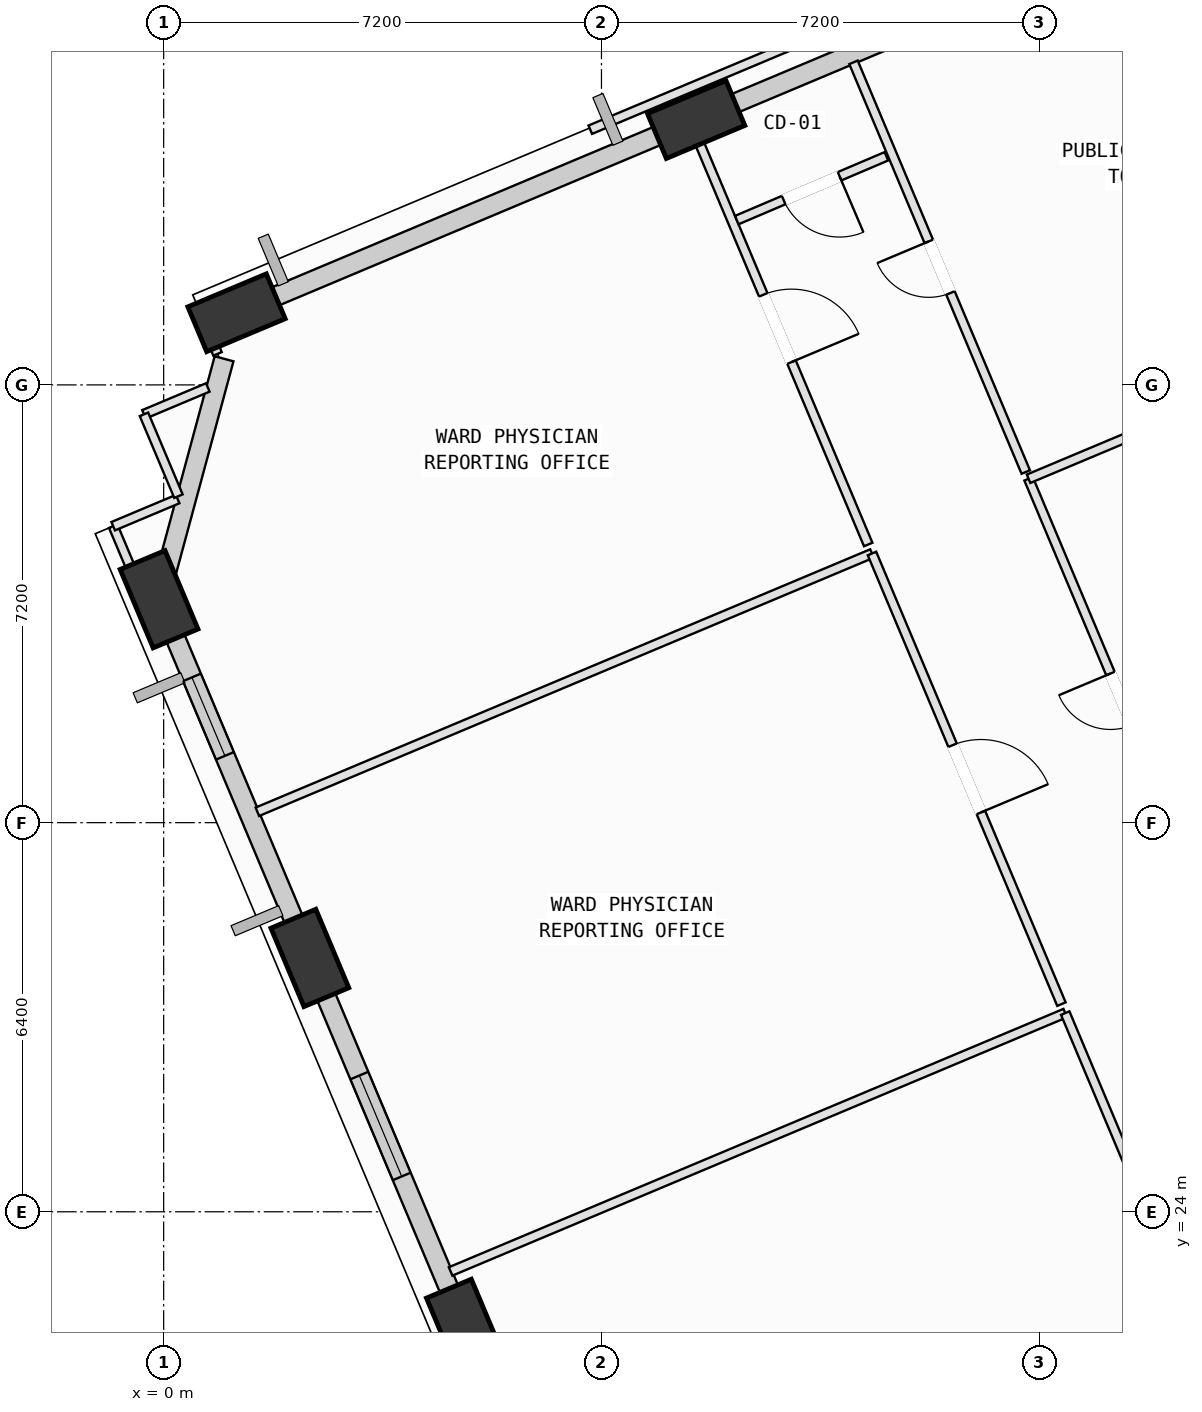
"""IFC4 building model, lengths in metres.
Left out: names, types, materials, properties, quantities, classifications, styles, units other than length and angle.
Written with IfcOpenShell. Run it as: python <this file> out.ifc"""

import sys

from ifc_helpers import new_model, si_unit, direction, frame, frame_2d, origin, origin_2d, place, context, subcontext, project, spatial, rectangle, extrude, element, fill, save


model = new_model("IFC4")
c1 = context("Model", 3, precision=1e-05, world=origin(), true_north=direction((0.0, 1.0)))
c2 = subcontext(c1, "Body", "Model", "MODEL_VIEW")
j1 = project(units=[si_unit("LENGTHUNIT", "METRE"), si_unit("PLANEANGLEUNIT", "RADIAN")], contexts=[c1])
p1 = place(None, origin())
s1 = spatial("IfcSite", under=j1, at=p1, CompositionType="ELEMENT")
p2 = place(p1, origin())
s2 = spatial("IfcBuilding", under=s1, at=p2, CompositionType="ELEMENT")
p3 = place(p2, frame((0.0, 0.0, 120.4)))
s3 = spatial("IfcBuildingStorey", under=s2, at=p3, CompositionType="ELEMENT", Elevation=120.4)
p4 = place(p3, frame((8.757, 41.964, 0.002), z_axis=(-0.069771417755, -0.102747656903, 0.992257460675), x_axis=(0.978659051429, -0.199775110531, 0.048128642913)))
e1 = element("IfcColumn", 1, at=p4, inside=s3, PredefinedType="COLUMN", context=c2, shape_type="SweptSolid", body=[
    extrude(rectangle(XDim=1.4, YDim=0.8, at=origin_2d()), origin(), (0.0, 0.0, 1.0), 4.028),
])
p5 = place(p3, frame((1.198, 38.786, 0.002), z_axis=(-0.056216653726, -0.133348320558, 0.989473553587), x_axis=(0.998414843252, -0.004791929271, 0.056078856879)))
e2 = element("IfcColumn", 2, at=p5, inside=s3, PredefinedType="COLUMN", context=c2, shape_type="SweptSolid", body=[
    extrude(rectangle(XDim=1.4, YDim=0.8, at=origin_2d()), origin(), (0.0, 0.0, 1.0), 4.039),
])
p6 = place(p3, frame((-0.075, 34.075, 0.002), z_axis=(-0.036941426088, -0.138454772083, 0.989679547695), x_axis=(-0.139219445833, 0.981410805172, 0.132101390582)))
e3 = element("IfcColumn", 3, at=p6, inside=s3, PredefinedType="COLUMN", context=c2, shape_type="SweptSolid", body=[
    extrude(rectangle(XDim=1.4, YDim=0.8, at=origin_2d()), origin(), (0.0, 0.0, 1.0), 4.038),
])
p7 = place(p3, frame((2.405, 28.175, 0.002), z_axis=(-0.012782507671, -0.128370302159, 0.991643924512), x_axis=(-0.295028824763, 0.948058445469, 0.118925087905)))
e4 = element("IfcColumn", 4, at=p7, inside=s3, PredefinedType="COLUMN", context=c2, shape_type="SweptSolid", body=[
    extrude(rectangle(XDim=1.4, YDim=0.8, at=origin_2d()), origin(), (0.0, 0.0, 1.0), 4.03),
])
p8 = place(p3, frame((4.962, 22.091, 0.002), z_axis=(0.012132234735, -0.117803999277, 0.992962751887), x_axis=(-0.479252206701, 0.870860755708, 0.109173561545)))
e5 = element("IfcColumn", 5, at=p8, inside=s3, PredefinedType="COLUMN", context=c2, shape_type="SweptSolid", body=[
    extrude(rectangle(XDim=1.4, YDim=0.8, at=origin_2d()), origin(), (0.0, 0.0, 1.0), 4.025),
])
p9 = place(p3, frame((9.004, 42.068, 0.0), z_axis=(0.0, 0.0, 1.0), x_axis=(0.921864651892, 0.387512017352, 0.0)))
e6 = element("IfcWall", 6, at=p9, inside=s3, PredefinedType="SOLIDWALL", context=c2, shape_type="SweptSolid", body=[
    extrude(rectangle(XDim=7.231, YDim=0.32, at=frame_2d((3.615, 0.0))), origin(), (0.0, 0.0, 1.0), 3.165),
])
p10 = place(p3, frame((1.422, 38.881, 0.0), z_axis=(0.0, 0.0, 1.0), x_axis=(0.921872247249, 0.387493948019, 0.0)))
e7 = element("IfcWall", 7, at=p10, inside=s3, PredefinedType="SOLIDWALL", context=c2, shape_type="SweptSolid", body=[
    extrude(rectangle(XDim=7.27, YDim=0.32, at=frame_2d((3.635, 0.0))), origin(), (0.0, 0.0, 1.0), 3.165),
])
p11 = place(p3, frame((-0.021, 34.274, 0.0), z_axis=(0.0, 0.0, 1.0), x_axis=(0.260923253486, 0.965359547418, 0.0)))
e8 = element("IfcWall", 8, at=p11, inside=s3, PredefinedType="SOLIDWALL", context=c2, shape_type="SweptSolid", body=[
    extrude(rectangle(XDim=3.89, YDim=0.32, at=frame_2d((1.945, 0.0))), origin(), (0.0, 0.0, 1.0), 3.165),
])
p12 = place(p3, frame((2.307, 28.407, 0.0), z_axis=(0.0, 0.0, 1.0), x_axis=(-0.387498752524, 0.921870227739, 0.0)))
e9 = element("IfcWall", 9, at=p12, inside=s3, PredefinedType="SOLIDWALL", context=c2, shape_type="SweptSolid", body=[
    extrude(rectangle(XDim=5.456, YDim=0.32, at=frame_2d((2.728, 0.0))), origin(), (0.0, 0.0, 1.0), 3.165),
])
p13 = place(p12, frame((3.354, 0.0, 0.75)))
e10 = element("IfcOpeningElement", 10, at=p13, cuts=e9, PredefinedType="OPENING", context=c2, shape_type="SweptSolid", body=[
    extrude(rectangle(XDim=1.4, YDim=1.85, at=frame_2d((0.7, 0.925))), frame((0.0, 0.17, 0.0), z_axis=(0.0, -1.0, 0.0), x_axis=(1.0, 0.0, 0.0)), (0.0, 0.0, 1.0), 0.34),
])
p14 = place(p3, frame((4.86, 22.333, 0.0), z_axis=(0.0, 0.0, 1.0), x_axis=(-0.387490609288, 0.921873650623, 0.0)))
e11 = element("IfcWall", 11, at=p14, inside=s3, PredefinedType="SOLIDWALL", context=c2, shape_type="SweptSolid", body=[
    extrude(rectangle(XDim=5.628, YDim=0.32, at=frame_2d((2.814, 0.0))), origin(), (0.0, 0.0, 1.0), 3.165),
])
p15 = place(p14, frame((2.438, 0.0, 0.75)))
e12 = element("IfcOpeningElement", 12, at=p15, cuts=e11, PredefinedType="OPENING", context=c2, shape_type="SweptSolid", body=[
    extrude(rectangle(XDim=1.8, YDim=2.05, at=frame_2d((0.9, 1.025))), frame((0.0, 0.17, 0.0), z_axis=(0.0, -1.0, 0.0), x_axis=(1.0, 0.0, 0.0)), (0.0, 0.0, 1.0), 0.34),
])
p16 = place(p3, frame((5.029, 21.338, 0.0), z_axis=(0.0, 0.0, 1.0), x_axis=(-0.38773494757, 0.921770909951, 0.0)))
e13 = element("IfcWall", 13, at=p16, inside=s3, PredefinedType="PARTITIONING", context=c2, shape_type="SweptSolid", body=[
    extrude(rectangle(XDim=0.983, YDim=0.15, at=frame_2d((0.491, 0.0))), origin(), (0.0, 0.0, 1.0), 3.165),
])
p17 = place(p3, frame((4.719, 23.019, 0.0), z_axis=(0.0, 0.0, 1.0), x_axis=(0.921861546859, 0.387519403931, 0.0)))
e14 = element("IfcWall", 14, at=p17, inside=s3, PredefinedType="PARTITIONING", context=c2, shape_type="SweptSolid", body=[
    extrude(rectangle(XDim=10.965, YDim=0.15, at=frame_2d((5.482, 0.0))), origin(), (0.0, 0.0, 1.0), 3.78),
])
p18 = place(p3, frame((14.827, 27.268, 0.0), z_axis=(0.0, 0.0, 1.0), x_axis=(0.387476197679, -0.921879708114, 0.0)))
e15 = element("IfcWall", 15, at=p18, inside=s3, PredefinedType="PARTITIONING", context=c2, shape_type="SweptSolid", body=[
    extrude(rectangle(XDim=7.255, YDim=0.15, at=frame_2d((3.627, 0.0))), origin(), (0.0, 0.0, 1.0), 3.78),
])
p19 = place(p18, frame((3.027, 0.0, 0.0)))
e16 = element("IfcOpeningElement", 16, at=p19, cuts=e15, PredefinedType="OPENING", context=c2, shape_type="SweptSolid", body=[
    extrude(rectangle(XDim=1.2, YDim=2.15, at=frame_2d((0.6, 1.075))), frame((0.0, 0.085, 0.0), z_axis=(0.0, -1.0, 0.0), x_axis=(1.0, 0.0, 0.0)), (0.0, 0.0, 1.0), 0.17),
])
p20 = place(p3, frame((1.541, 30.579, 0.0), z_axis=(0.0, 0.0, 1.0), x_axis=(0.921901315363, 0.387424785904, 0.0)))
e17 = element("IfcWall", 17, at=p20, inside=s3, PredefinedType="PARTITIONING", context=c2, shape_type="SweptSolid", body=[
    extrude(rectangle(XDim=10.964, YDim=0.15, at=frame_2d((5.482, 0.0))), origin(), (0.0, 0.0, 1.0), 3.78),
])
p21 = place(p3, frame((11.649, 34.827, 0.0), z_axis=(0.0, 0.0, 1.0), x_axis=(0.387547881375, -0.921849575387, 0.0)))
e18 = element("IfcWall", 18, at=p21, inside=s3, PredefinedType="PARTITIONING", context=c2, shape_type="SweptSolid", body=[
    extrude(rectangle(XDim=8.04, YDim=0.15, at=frame_2d((4.02, 0.0))), origin(), (0.0, 0.0, 1.0), 3.78),
])
p22 = place(p21, frame((3.42, 0.0, 0.0)))
e19 = element("IfcOpeningElement", 19, at=p22, cuts=e18, PredefinedType="OPENING", context=c2, shape_type="SweptSolid", body=[
    extrude(rectangle(XDim=1.2, YDim=2.15, at=frame_2d((0.6, 1.075))), frame((0.0, 0.085, 0.0), z_axis=(0.0, -1.0, 0.0), x_axis=(1.0, 0.0, 0.0)), (0.0, 0.0, 1.0), 0.17),
])
p23 = place(p3, frame((2.467, 27.432, 0.0), z_axis=(0.0, 0.0, 1.0), x_axis=(-0.38710293044, 0.922036507544, 0.0)))
e20 = element("IfcWall", 20, at=p23, inside=s3, PredefinedType="PARTITIONING", context=c2, shape_type="SweptSolid", body=[
    extrude(rectangle(XDim=0.961, YDim=0.15, at=frame_2d((0.48, 0.0))), origin(), (0.0, 0.0, 1.0), 3.165),
])
p24 = place(p3, frame((-0.324, 37.116, 0.0), z_axis=(0.0, 0.0, 1.0), x_axis=(0.921631341525, 0.388066579749, 0.0)))
e21 = element("IfcWall", 21, at=p24, inside=s3, PredefinedType="PARTITIONING", context=c2, shape_type="SweptSolid", body=[
    extrude(rectangle(XDim=1.139, YDim=0.15, at=frame_2d((0.57, 0.0))), origin(), (0.0, 0.0, 1.0), 3.78),
])
p25 = place(p3, frame((0.886, 38.11, 0.0), z_axis=(0.0, 0.0, 1.0), x_axis=(-0.388040772023, 0.921642207827, 0.0)))
e22 = element("IfcWall", 22, at=p25, inside=s3, PredefinedType="PARTITIONING", context=c2, shape_type="SweptSolid", body=[
    extrude(rectangle(XDim=0.673, YDim=0.15, at=frame_2d((0.336, 0.0))), origin(), (0.0, 0.0, 1.0), 2.965),
])
p26 = place(p3, frame((0.625, 38.73, 0.0), z_axis=(0.0, 0.0, 1.0), x_axis=(0.92192492909, 0.38736859078, 0.0)))
e23 = element("IfcWall", 23, at=p26, inside=s3, PredefinedType="PARTITIONING", context=c2, shape_type="SweptSolid", body=[
    extrude(rectangle(XDim=0.793, YDim=0.15, at=frame_2d((0.396, 0.0))), origin(), (0.0, 0.0, 1.0), 3.78),
])
p27 = place(p3, frame((8.058, 41.855, 0.0), z_axis=(0.0, 0.0, 1.0), x_axis=(0.922089032522, 0.386977797945, 0.0)))
e24 = element("IfcWall", 24, at=p27, inside=s3, PredefinedType="PARTITIONING", context=c2, shape_type="SweptSolid", body=[
    extrude(rectangle(XDim=0.587, YDim=0.15, at=frame_2d((0.293, 0.0))), origin(), (0.0, 0.0, 1.0), 3.78),
])
p28 = place(p3, frame((8.599, 42.082, 0.0), z_axis=(0.0, 0.0, 1.0), x_axis=(0.387550108115, -0.921848639257, 0.0)))
e25 = element("IfcWall", 25, at=p28, inside=s3, PredefinedType="PARTITIONING", context=c2, shape_type="SweptSolid", body=[
    extrude(rectangle(XDim=7.709, YDim=0.15, at=frame_2d((3.855, 0.0))), origin(), (0.0, 0.0, 1.0), 2.965),
])
p29 = place(p28, frame((3.255, 0.0, 0.0)))
e26 = element("IfcOpeningElement", 26, at=p29, cuts=e25, PredefinedType="OPENING", context=c2, shape_type="SweptSolid", body=[
    extrude(rectangle(XDim=1.2, YDim=2.15, at=frame_2d((0.6, 1.075))), frame((0.0, 0.085, 0.0), z_axis=(0.0, -1.0, 0.0), x_axis=(1.0, 0.0, 0.0)), (0.0, 0.0, 1.0), 0.17),
])
p30 = place(p3, frame((-0.019, 33.347, 0.0), z_axis=(0.0, 0.0, 1.0), x_axis=(-0.387587512706, 0.921832913273, 0.0)))
e27 = element("IfcWall", 27, at=p30, inside=s3, PredefinedType="PARTITIONING", context=c2, shape_type="SweptSolid", body=[
    extrude(rectangle(XDim=2.093, YDim=0.15, at=frame_2d((1.046, 0.0))), origin(), (0.0, 0.0, 1.0), 3.165),
])
p31 = place(p3, frame((-0.83, 35.276, 0.0), z_axis=(0.0, 0.0, 1.0), x_axis=(0.921727254791, 0.387838713612, 0.0)))
e28 = element("IfcWall", 28, at=p31, inside=s3, PredefinedType="PARTITIONING", context=c2, shape_type="SweptSolid", body=[
    extrude(rectangle(XDim=1.15, YDim=0.15, at=frame_2d((0.575, 0.0))), origin(), (0.0, 0.0, 1.0), 3.78),
])
p32 = place(p3, frame((0.243, 35.77, 0.0), z_axis=(0.0, 0.0, 1.0), x_axis=(-0.388161624393, 0.921591315795, 0.0)))
e29 = element("IfcWall", 29, at=p32, inside=s3, PredefinedType="PARTITIONING", context=c2, shape_type="SweptSolid", body=[
    extrude(rectangle(XDim=1.46, YDim=0.15, at=frame_2d((0.73, 0.0))), origin(), (0.0, 0.0, 1.0), 3.78),
])
p33 = place(p3, frame((17.274, 28.801, 0.0), z_axis=(0.0, 0.0, 1.0), x_axis=(-0.387529923364, 0.921857124775, 0.0)))
e30 = element("IfcWall", 30, at=p33, inside=s3, PredefinedType="PARTITIONING", context=c2, shape_type="SweptSolid", body=[
    extrude(rectangle(XDim=7.87, YDim=0.15, at=frame_2d((3.935, 0.0))), origin(), (0.0, 0.0, 1.0), 3.78),
])
p34 = place(p33, frame((3.475, 0.0, 0.0)))
e31 = element("IfcOpeningElement", 31, at=p34, cuts=e30, PredefinedType="OPENING", context=c2, shape_type="SweptSolid", body=[
    extrude(rectangle(XDim=0.92, YDim=2.1, at=frame_2d((0.46, 1.05))), frame((0.0, 0.085, 0.0), z_axis=(0.0, -1.0, 0.0), x_axis=(1.0, 0.0, 0.0)), (0.0, 0.0, 1.0), 0.17),
])
p35 = place(p3, frame((14.224, 36.056, 0.0), z_axis=(0.0, 0.0, 1.0), x_axis=(0.921863124429, 0.387515651062, 0.0)))
e32 = element("IfcWall", 32, at=p35, inside=s3, PredefinedType="PARTITIONING", context=c2, shape_type="SweptSolid", body=[
    extrude(rectangle(XDim=6.815, YDim=0.15, at=frame_2d((3.408, 0.0))), origin(), (0.0, 0.0, 1.0), 3.78),
])
p36 = place(p3, frame((14.178, 36.167, 0.0), z_axis=(0.0, 0.0, 1.0), x_axis=(-0.387585091444, 0.921833931297, 0.0)))
e33 = element("IfcWall", 33, at=p36, inside=s3, PredefinedType="PARTITIONING", context=c2, shape_type="SweptSolid", body=[
    extrude(rectangle(XDim=7.309, YDim=0.15, at=frame_2d((3.655, 0.0))), origin(), (0.0, 0.0, 1.0), 3.78),
])
p37 = place(p36, frame((3.195, 0.0, 0.0)))
e34 = element("IfcOpeningElement", 34, at=p37, cuts=e33, PredefinedType="OPENING", context=c2, shape_type="SweptSolid", body=[
    extrude(rectangle(XDim=0.92, YDim=2.1, at=frame_2d((0.46, 1.05))), frame((0.0, 0.085, 0.0), z_axis=(0.0, -1.0, 0.0), x_axis=(1.0, 0.0, 0.0)), (0.0, 0.0, 1.0), 0.17),
])
p38 = place(p3, frame((7.016, 41.797, 0.0), z_axis=(0.0, 0.0, 1.0), x_axis=(0.921904949916, 0.387416137146, 0.0)))
e35 = element("IfcWall", 35, at=p38, inside=s3, PredefinedType="PARTITIONING", context=c2, shape_type="SweptSolid", body=[
    extrude(rectangle(XDim=5.74, YDim=0.15, at=frame_2d((2.87, 0.0))), origin(), (0.0, 0.0, 1.0), 3.78),
])
p39 = place(p3, frame((11.886, 41.36, 0.0), z_axis=(0.0, 0.0, 1.0), x_axis=(-0.919847133492, -0.392277008001, 0.0)))
e36 = element("IfcWall", 36, at=p39, inside=s3, PredefinedType="PARTITIONING", context=c2, shape_type="SweptSolid", body=[
    extrude(rectangle(XDim=2.674, YDim=0.15, at=frame_2d((1.337, 0.0))), origin(), (0.0, 0.0, 1.0), 3.78),
])
p40 = place(p39, frame((0.837, 0.0, 0.0)))
e37 = element("IfcOpeningElement", 37, at=p40, cuts=e36, PredefinedType="OPENING", context=c2, shape_type="SweptSolid", body=[
    extrude(rectangle(XDim=1.0, YDim=2.12, at=frame_2d((0.5, 1.06))), frame((0.0, 0.085, 0.0), z_axis=(0.0, -1.0, 0.0), x_axis=(1.0, 0.0, 0.0)), (0.0, 0.0, 1.0), 0.17),
])
p41 = place(p13, origin())
e38 = element("IfcWindow", 38, at=p41, inside=s3, PartitioningType="SINGLE_PANEL", PredefinedType="WINDOW", context=c2, shape_type="SweptSolid", body=[
    extrude(rectangle(XDim=1.4, YDim=1.85, at=frame_2d((0.7, 0.925))), frame((0.0, 0.03, 0.0), z_axis=(0.0, -1.0, 0.0), x_axis=(1.0, 0.0, 0.0)), (0.0, 0.0, 1.0), 0.06),
])
fill(e10, e38)
p42 = place(p15, origin())
e39 = element("IfcWindow", 39, at=p42, inside=s3, PartitioningType="SINGLE_PANEL", PredefinedType="WINDOW", context=c2, shape_type="SweptSolid", body=[
    extrude(rectangle(XDim=1.8, YDim=2.05, at=frame_2d((0.9, 1.025))), frame((0.0, 0.03, 0.0), z_axis=(0.0, -1.0, 0.0), x_axis=(1.0, 0.0, 0.0)), (0.0, 0.0, 1.0), 0.06),
])
fill(e12, e39)
p43 = place(p22, origin())
e40 = element("IfcDoor", 40, at=p43, inside=s3, OperationType="SINGLE_SWING_RIGHT", PredefinedType="DOOR", context=c2, shape_type="SweptSolid", body=[
    extrude(rectangle(XDim=1.2, YDim=2.15, at=frame_2d((0.6, 1.075))), frame((0.0, 0.025, 0.0), z_axis=(0.0, -1.0, 0.0), x_axis=(1.0, 0.0, 0.0)), (0.0, 0.0, 1.0), 0.05),
])
fill(e19, e40)
p44 = place(p29, origin())
e41 = element("IfcDoor", 41, at=p44, inside=s3, OperationType="SINGLE_SWING_RIGHT", PredefinedType="DOOR", context=c2, shape_type="SweptSolid", body=[
    extrude(rectangle(XDim=1.2, YDim=2.15, at=frame_2d((0.6, 1.075))), frame((0.0, 0.025, 0.0), z_axis=(0.0, -1.0, 0.0), x_axis=(1.0, 0.0, 0.0)), (0.0, 0.0, 1.0), 0.05),
])
fill(e26, e41)
p45 = place(p34, origin())
e42 = element("IfcDoor", 42, at=p45, inside=s3, OperationType="SINGLE_SWING_RIGHT", PredefinedType="DOOR", context=c2, shape_type="SweptSolid", body=[
    extrude(rectangle(XDim=0.92, YDim=2.1, at=frame_2d((0.46, 1.05))), frame((0.0, 0.025, 0.0), z_axis=(0.0, -1.0, 0.0), x_axis=(1.0, 0.0, 0.0)), (0.0, 0.0, 1.0), 0.05),
])
fill(e31, e42)
p46 = place(p37, origin())
e43 = element("IfcDoor", 43, at=p46, inside=s3, OperationType="SINGLE_SWING_RIGHT", PredefinedType="DOOR", context=c2, shape_type="SweptSolid", body=[
    extrude(rectangle(XDim=0.92, YDim=2.1, at=frame_2d((0.46, 1.05))), frame((0.0, 0.025, 0.0), z_axis=(0.0, -1.0, 0.0), x_axis=(1.0, 0.0, 0.0)), (0.0, 0.0, 1.0), 0.05),
])
fill(e34, e43)
p47 = place(p40, origin())
e44 = element("IfcDoor", 44, at=p47, inside=s3, OperationType="SINGLE_SWING_LEFT", PredefinedType="DOOR", context=c2, shape_type="SweptSolid", body=[
    extrude(rectangle(XDim=1.0, YDim=2.12, at=frame_2d((0.5, 1.06))), frame((0.0, 0.025, 0.0), z_axis=(0.0, -1.0, 0.0), x_axis=(1.0, 0.0, 0.0)), (0.0, 0.0, 1.0), 0.05),
])
fill(e37, e44)
save(model, sys.argv[1])
